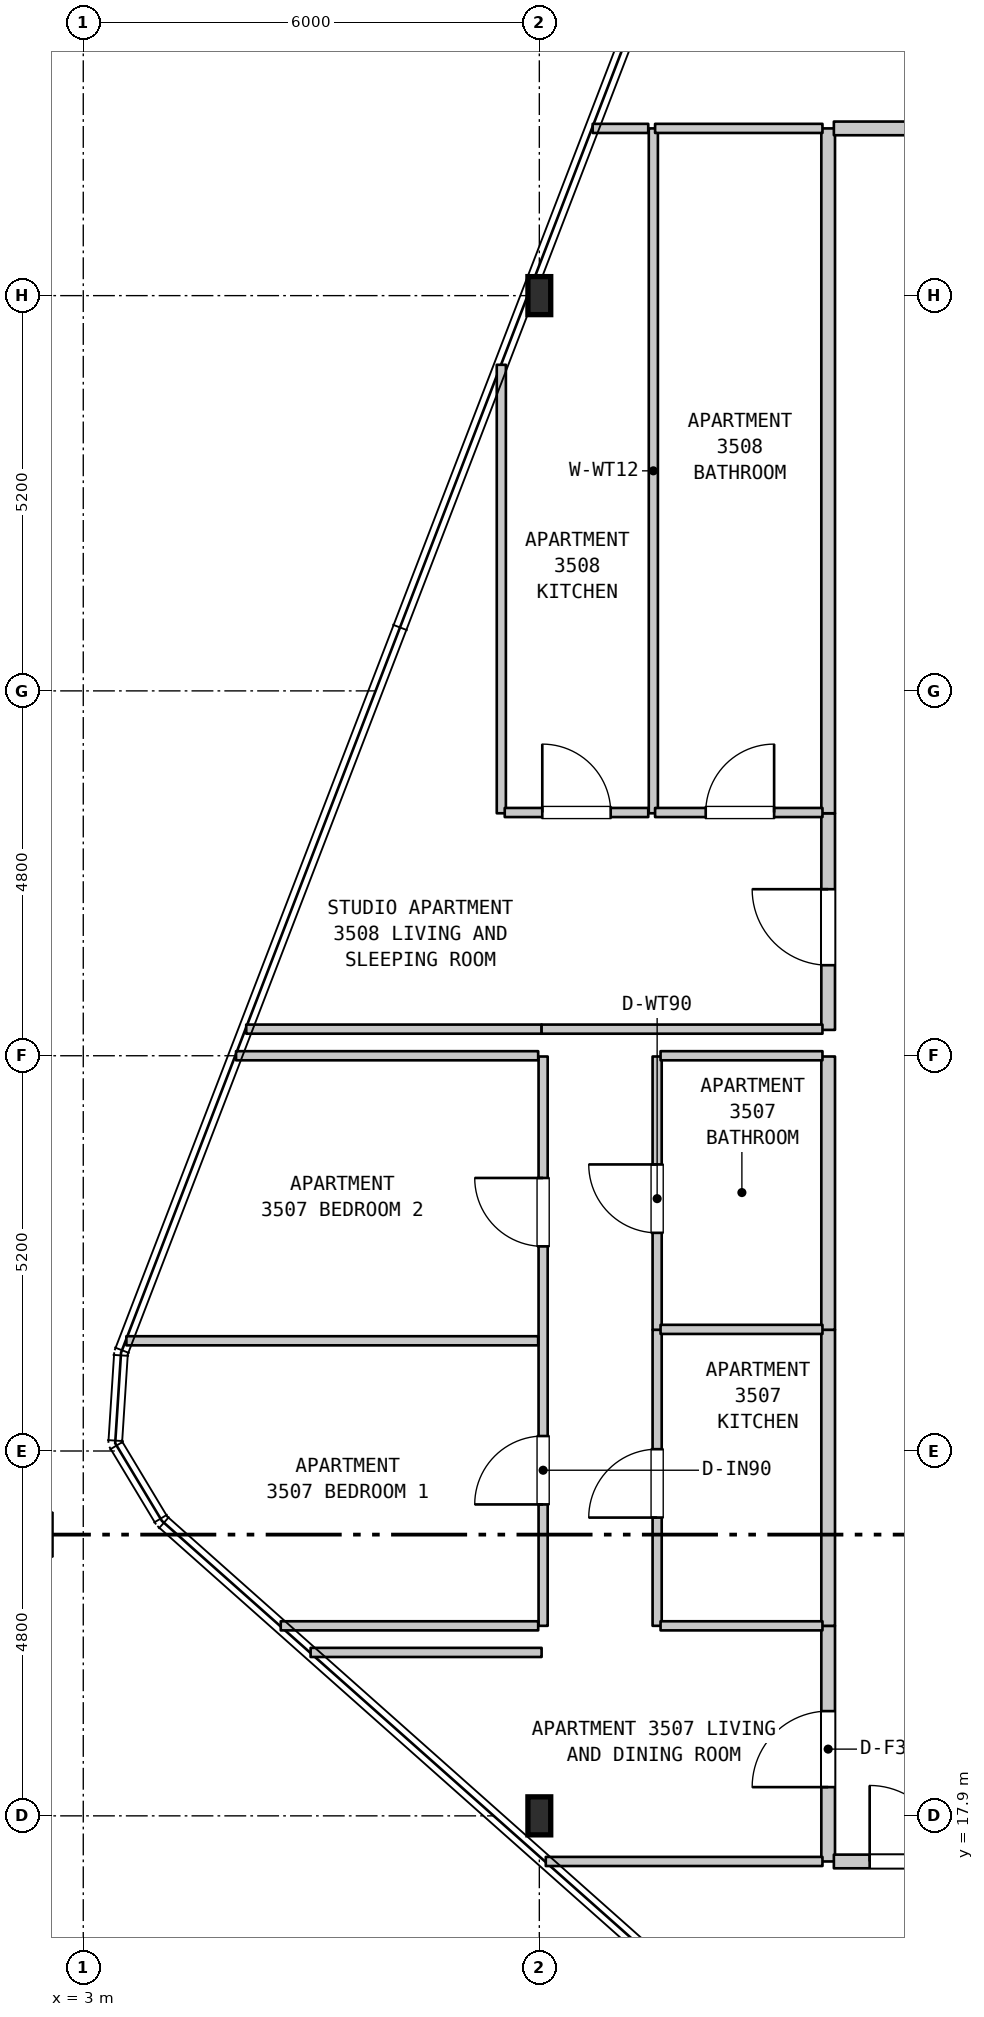
"""IFC4 building model, lengths in metres.
Left out: names, types, materials, properties, quantities, classifications, styles, units other than length and angle.
Written with IfcOpenShell. Run it as: python <this file> out.ifc"""

import sys

from ifc_helpers import new_model, si_unit, direction, frame, frame_2d, origin, origin_2d, place, context, subcontext, project, spatial, rectangle, i_section, extrude, element, fill, save


model = new_model("IFC4")
c1 = context("Model", 3, precision=1e-05, world=origin(), true_north=direction((0.0, 1.0)))
c2 = subcontext(c1, "Body", "Model", "MODEL_VIEW")
j1 = project(units=[si_unit("LENGTHUNIT", "METRE"), si_unit("PLANEANGLEUNIT", "RADIAN")], contexts=[c1])
p1 = place(None, origin())
s1 = spatial("IfcSite", under=j1, at=p1, CompositionType="ELEMENT")
p2 = place(p1, origin())
s2 = spatial("IfcBuilding", under=s1, at=p2, CompositionType="ELEMENT")
p3 = place(p2, frame((0.0, 0.0, 144.6)))
s3 = spatial("IfcBuildingStorey", under=s2, at=p3, CompositionType="ELEMENT", Elevation=144.6)
for number, where, z_axis, x_axis in (
    (1, (9.0, 17.9, 0.0), (0.0, 0.0, 1.0), (1.0, 0.0, 0.0)),
    (2, (9.0, 37.9, 0.0), (0.0, 0.0, 1.0), (1.0, 0.0, 0.0)),
):
    element("IfcColumn", number, at=place(p3, frame(where, z_axis=z_axis, x_axis=x_axis)), inside=s3, PredefinedType="COLUMN", context=c2, shape_type="SweptSolid", body=[
        extrude(i_section(OverallWidth=0.3, OverallDepth=0.5, WebThickness=0.014, FlangeThickness=0.028, FilletRadius=0.027, at=origin_2d()), origin(), (0.0, 0.0, 1.0), 3.7),
    ])
p4 = place(p3, frame((8.5, 31.09, 0.0), z_axis=(0.0, 0.0, 1.0), x_axis=(0.0, 1.0, 0.0)))
e3 = element("IfcWall", 3, at=p4, inside=s3, PredefinedType="PARTITIONING", context=c2, shape_type="SweptSolid", body=[
    extrude(rectangle(XDim=5.9, YDim=0.12, at=frame_2d((2.95, 0.0))), origin(), (0.0, 0.0, 1.0), 3.385),
])
p5 = place(p3, frame((9.05, 20.4, 0.0), z_axis=(0.0, 0.0, 1.0), x_axis=(0.0, 1.0, 0.0)))
e4 = element("IfcWall", 4, at=p5, inside=s3, PredefinedType="PARTITIONING", context=c2, shape_type="SweptSolid", body=[
    extrude(rectangle(XDim=7.49, YDim=0.12, at=frame_2d((3.745, 0.0))), origin(), (0.0, 0.0, 1.0), 2.785),
])
p6 = place(p5, frame((1.597, 0.0, 0.0)))
e5 = element("IfcOpeningElement", 5, at=p6, cuts=e4, PredefinedType="OPENING", context=c2, shape_type="SweptSolid", body=[
    extrude(rectangle(XDim=0.9, YDim=2.15, at=frame_2d((0.45, 1.075))), frame((0.0, 0.07, 0.0), z_axis=(0.0, -1.0, 0.0), x_axis=(1.0, 0.0, 0.0)), (0.0, 0.0, 1.0), 0.14),
])
p7 = place(p5, frame((4.992, 0.0, 0.0)))
e6 = element("IfcOpeningElement", 6, at=p7, cuts=e4, PredefinedType="OPENING", context=c2, shape_type="SweptSolid", body=[
    extrude(rectangle(XDim=0.9, YDim=2.15, at=frame_2d((0.45, 1.075))), frame((0.0, 0.07, 0.0), z_axis=(0.0, -1.0, 0.0), x_axis=(1.0, 0.0, 0.0)), (0.0, 0.0, 1.0), 0.14),
])
p8 = place(p3, frame((10.5, 31.09, 0.0), z_axis=(0.0, 0.0, 1.0), x_axis=(0.0, 1.0, 0.0)))
e7 = element("IfcWall", 7, at=p8, inside=s3, PredefinedType="PARTITIONING", context=c2, shape_type="SweptSolid", body=[
    extrude(rectangle(XDim=9.01, YDim=0.12, at=frame_2d((4.505, 0.0))), origin(), (0.0, 0.0, 1.0), 3.385),
])
p9 = place(p3, frame((10.55, 20.4, 0.0), z_axis=(0.0, 0.0, 1.0), x_axis=(0.0, 1.0, 0.0)))
e8 = element("IfcWall", 8, at=p9, inside=s3, PredefinedType="PARTITIONING", context=c2, shape_type="SweptSolid", body=[
    extrude(rectangle(XDim=3.895, YDim=0.12, at=frame_2d((1.948, 0.0))), origin(), (0.0, 0.0, 1.0), 3.385),
])
p10 = place(p9, frame((1.424, 0.0, 0.0)))
e9 = element("IfcOpeningElement", 9, at=p10, cuts=e8, PredefinedType="OPENING", context=c2, shape_type="SweptSolid", body=[
    extrude(rectangle(XDim=0.9, YDim=2.15, at=frame_2d((0.45, 1.075))), frame((0.0, 0.07, 0.0), z_axis=(0.0, -1.0, 0.0), x_axis=(1.0, 0.0, 0.0)), (0.0, 0.0, 1.0), 0.14),
])
p11 = place(p3, frame((10.55, 24.295, 0.0), z_axis=(0.0, 0.0, 1.0), x_axis=(0.0, 1.0, 0.0)))
e10 = element("IfcWall", 10, at=p11, inside=s3, PredefinedType="PARTITIONING", context=c2, shape_type="SweptSolid", body=[
    extrude(rectangle(XDim=3.595, YDim=0.12, at=frame_2d((1.797, 0.0))), origin(), (0.0, 0.0, 1.0), 3.385),
])
p12 = place(p11, frame((1.275, 0.0, 0.0)))
e11 = element("IfcOpeningElement", 11, at=p12, cuts=e10, PredefinedType="OPENING", context=c2, shape_type="SweptSolid", body=[
    extrude(rectangle(XDim=0.9, YDim=2.1, at=frame_2d((0.45, 1.05))), frame((0.0, 0.07, 0.0), z_axis=(0.0, -1.0, 0.0), x_axis=(1.0, 0.0, 0.0)), (0.0, 0.0, 1.0), 0.14),
])
p13 = place(p3, frame((12.8, 17.3, 0.0), z_axis=(0.0, 0.0, 1.0), x_axis=(0.0, 1.0, 0.0)))
e12 = element("IfcWall", 12, at=p13, inside=s3, PredefinedType="STANDARD", context=c2, shape_type="SweptSolid", body=[
    extrude(rectangle(XDim=3.1, YDim=0.18, at=frame_2d((1.55, 0.0))), origin(), (0.0, 0.0, 1.0), 3.385),
])
p14 = place(p13, frame((0.978, 0.0, 0.0)))
e13 = element("IfcOpeningElement", 13, at=p14, cuts=e12, PredefinedType="OPENING", context=c2, shape_type="SweptSolid", body=[
    extrude(rectangle(XDim=1.0, YDim=2.15, at=frame_2d((0.5, 1.075))), frame((0.0, 0.1, 0.0), z_axis=(0.0, -1.0, 0.0), x_axis=(1.0, 0.0, 0.0)), (0.0, 0.0, 1.0), 0.2),
])
p15 = place(p3, frame((12.8, 20.4, 0.0), z_axis=(0.0, 0.0, 1.0), x_axis=(0.0, 1.0, 0.0)))
e14 = element("IfcWall", 14, at=p15, inside=s3, PredefinedType="STANDARD", context=c2, shape_type="SweptSolid", body=[
    extrude(rectangle(XDim=3.895, YDim=0.18, at=frame_2d((1.948, 0.0))), origin(), (0.0, 0.0, 1.0), 3.385),
])
p16 = place(p3, frame((12.8, 24.295, 0.0), z_axis=(0.0, 0.0, 1.0), x_axis=(0.0, 1.0, 0.0)))
e15 = element("IfcWall", 15, at=p16, inside=s3, PredefinedType="STANDARD", context=c2, shape_type="SweptSolid", body=[
    extrude(rectangle(XDim=3.595, YDim=0.18, at=frame_2d((1.797, 0.0))), origin(), (0.0, 0.0, 1.0), 3.385),
])
p17 = place(p3, frame((12.8, 28.24, 0.0), z_axis=(0.0, 0.0, 1.0), x_axis=(0.0, 1.0, 0.0)))
e16 = element("IfcWall", 16, at=p17, inside=s3, PredefinedType="STANDARD", context=c2, shape_type="SweptSolid", body=[
    extrude(rectangle(XDim=2.85, YDim=0.18, at=frame_2d((1.425, 0.0))), origin(), (0.0, 0.0, 1.0), 3.385),
])
p18 = place(p17, frame((0.851, 0.0, 0.0)))
e17 = element("IfcOpeningElement", 17, at=p18, cuts=e16, PredefinedType="OPENING", context=c2, shape_type="SweptSolid", body=[
    extrude(rectangle(XDim=1.0, YDim=2.15, at=frame_2d((0.5, 1.075))), frame((0.0, 0.1, 0.0), z_axis=(0.0, -1.0, 0.0), x_axis=(1.0, 0.0, 0.0)), (0.0, 0.0, 1.0), 0.2),
])
p19 = place(p3, frame((12.8, 31.09, 0.0), z_axis=(0.0, 0.0, 1.0), x_axis=(0.0, 1.0, 0.0)))
e18 = element("IfcWall", 18, at=p19, inside=s3, PredefinedType="STANDARD", context=c2, shape_type="SweptSolid", body=[
    extrude(rectangle(XDim=9.01, YDim=0.18, at=frame_2d((4.505, 0.0))), origin(), (0.0, 0.0, 1.0), 3.385),
])
p20 = place(p3, frame((9.085, 17.3, 0.0), z_axis=(0.0, 0.0, 1.0), x_axis=(1.0, 0.0, 0.0)))
e19 = element("IfcWall", 19, at=p20, inside=s3, PredefinedType="PARTITIONING", context=c2, shape_type="SweptSolid", body=[
    extrude(rectangle(XDim=3.64, YDim=0.12, at=frame_2d((1.82, 0.0))), origin(), (0.0, 0.0, 1.0), 3.385),
])
p21 = place(p3, frame((12.875, 17.3, 0.0), z_axis=(0.0, 0.0, 1.0), x_axis=(1.0, 0.0, 0.0)))
e20 = element("IfcWall", 20, at=p21, inside=s3, PredefinedType="STANDARD", context=c2, shape_type="SweptSolid", body=[
    extrude(rectangle(XDim=3.28, YDim=0.18, at=frame_2d((1.64, 0.0))), origin(), (0.0, 0.0, 1.0), 3.385),
])
p22 = place(p21, frame((0.471, 0.0, 0.0)))
e21 = element("IfcOpeningElement", 21, at=p22, cuts=e20, PredefinedType="OPENING", context=c2, shape_type="SweptSolid", body=[
    extrude(rectangle(XDim=1.0, YDim=2.15, at=frame_2d((0.5, 1.075))), frame((0.0, 0.1, 0.0), z_axis=(0.0, -1.0, 0.0), x_axis=(1.0, 0.0, 0.0)), (0.0, 0.0, 1.0), 0.2),
])
p23 = place(p3, frame((5.991, 20.05, 0.0), z_axis=(0.0, 0.0, 1.0), x_axis=(1.0, 0.0, 0.0)))
e22 = element("IfcWall", 22, at=p23, inside=s3, PredefinedType="PARTITIONING", context=c2, shape_type="SweptSolid", body=[
    extrude(rectangle(XDim=3.039, YDim=0.12, at=frame_2d((1.52, 0.0))), origin(), (0.0, 0.0, 1.0), 3.385),
])
p24 = place(p3, frame((5.598, 20.4, 0.0), z_axis=(0.0, 0.0, 1.0), x_axis=(1.0, 0.0, 0.0)))
e23 = element("IfcWall", 23, at=p24, inside=s3, PredefinedType="PARTITIONING", context=c2, shape_type="SweptSolid", body=[
    extrude(rectangle(XDim=3.387, YDim=0.12, at=frame_2d((1.694, 0.0))), origin(), (0.0, 0.0, 1.0), 3.385),
])
p25 = place(p3, frame((10.595, 20.4, 0.0), z_axis=(0.0, 0.0, 1.0), x_axis=(1.0, 0.0, 0.0)))
e24 = element("IfcWall", 24, at=p25, inside=s3, PredefinedType="PARTITIONING", context=c2, shape_type="SweptSolid", body=[
    extrude(rectangle(XDim=2.13, YDim=0.12, at=frame_2d((1.065, 0.0))), origin(), (0.0, 0.0, 1.0), 3.385),
])
p26 = place(p3, frame((3.567, 24.15, 0.0), z_axis=(0.0, 0.0, 1.0), x_axis=(1.0, 0.0, 0.0)))
e25 = element("IfcWall", 25, at=p26, inside=s3, PredefinedType="PARTITIONING", context=c2, shape_type="SweptSolid", body=[
    extrude(rectangle(XDim=5.418, YDim=0.12, at=frame_2d((2.709, 0.0))), origin(), (0.0, 0.0, 1.0), 3.385),
])
p27 = place(p3, frame((10.595, 24.3, 0.0), z_axis=(0.0, 0.0, 1.0), x_axis=(1.0, 0.0, 0.0)))
e26 = element("IfcWall", 26, at=p27, inside=s3, PredefinedType="PARTITIONING", context=c2, shape_type="SweptSolid", body=[
    extrude(rectangle(XDim=2.13, YDim=0.12, at=frame_2d((1.065, 0.0))), origin(), (0.0, 0.0, 1.0), 3.385),
])
p28 = place(p3, frame((5.01, 27.9, 0.0), z_axis=(0.0, 0.0, 1.0), x_axis=(1.0, 0.0, 0.0)))
e27 = element("IfcWall", 27, at=p28, inside=s3, PredefinedType="PARTITIONING", context=c2, shape_type="SweptSolid", body=[
    extrude(rectangle(XDim=3.975, YDim=0.12, at=frame_2d((1.988, 0.0))), origin(), (0.0, 0.0, 1.0), 3.385),
])
p29 = place(p3, frame((10.595, 27.9, 0.0), z_axis=(0.0, 0.0, 1.0), x_axis=(1.0, 0.0, 0.0)))
e28 = element("IfcWall", 28, at=p29, inside=s3, PredefinedType="PARTITIONING", context=c2, shape_type="SweptSolid", body=[
    extrude(rectangle(XDim=2.13, YDim=0.12, at=frame_2d((1.065, 0.0))), origin(), (0.0, 0.0, 1.0), 3.385),
])
p30 = place(p3, frame((5.144, 28.25, 0.0), z_axis=(0.0, 0.0, 1.0), x_axis=(1.0, 0.0, 0.0)))
e29 = element("IfcWall", 29, at=p30, inside=s3, PredefinedType="PARTITIONING", context=c2, shape_type="SweptSolid", body=[
    extrude(rectangle(XDim=3.886, YDim=0.12, at=frame_2d((1.943, 0.0))), origin(), (0.0, 0.0, 1.0), 3.385),
])
p31 = place(p3, frame((9.03, 28.25, 0.0), z_axis=(0.0, 0.0, 1.0), x_axis=(1.0, 0.0, 0.0)))
e30 = element("IfcWall", 30, at=p31, inside=s3, PredefinedType="PARTITIONING", context=c2, shape_type="SweptSolid", body=[
    extrude(rectangle(XDim=3.695, YDim=0.12, at=frame_2d((1.848, 0.0))), origin(), (0.0, 0.0, 1.0), 3.385),
])
p32 = place(p3, frame((8.545, 31.1, 0.0), z_axis=(0.0, 0.0, 1.0), x_axis=(1.0, 0.0, 0.0)))
e31 = element("IfcWall", 31, at=p32, inside=s3, PredefinedType="PARTITIONING", context=c2, shape_type="SweptSolid", body=[
    extrude(rectangle(XDim=1.888, YDim=0.12, at=frame_2d((0.944, 0.0))), origin(), (0.0, 0.0, 1.0), 3.385),
])
p33 = place(p32, frame((0.494, 0.0, 0.0)))
e32 = element("IfcOpeningElement", 32, at=p33, cuts=e31, PredefinedType="OPENING", context=c2, shape_type="SweptSolid", body=[
    extrude(rectangle(XDim=0.9, YDim=2.15, at=frame_2d((0.45, 1.075))), frame((0.0, 0.07, 0.0), z_axis=(0.0, -1.0, 0.0), x_axis=(1.0, 0.0, 0.0)), (0.0, 0.0, 1.0), 0.14),
])
p34 = place(p3, frame((10.523, 31.1, 0.0), z_axis=(0.0, 0.0, 1.0), x_axis=(1.0, 0.0, 0.0)))
e33 = element("IfcWall", 33, at=p34, inside=s3, PredefinedType="PARTITIONING", context=c2, shape_type="SweptSolid", body=[
    extrude(rectangle(XDim=2.202, YDim=0.12, at=frame_2d((1.101, 0.0))), origin(), (0.0, 0.0, 1.0), 3.385),
])
p35 = place(p34, frame((0.666, 0.0, 0.0)))
e34 = element("IfcOpeningElement", 34, at=p35, cuts=e33, PredefinedType="OPENING", context=c2, shape_type="SweptSolid", body=[
    extrude(rectangle(XDim=0.9, YDim=2.1, at=frame_2d((0.45, 1.05))), frame((0.0, 0.07, 0.0), z_axis=(0.0, -1.0, 0.0), x_axis=(1.0, 0.0, 0.0)), (0.0, 0.0, 1.0), 0.14),
])
p36 = place(p3, frame((9.702, 40.1, 0.0), z_axis=(0.0, 0.0, 1.0), x_axis=(1.0, 0.0, 0.0)))
e35 = element("IfcWall", 35, at=p36, inside=s3, PredefinedType="PARTITIONING", context=c2, shape_type="SweptSolid", body=[
    extrude(rectangle(XDim=0.731, YDim=0.12, at=frame_2d((0.366, 0.0))), origin(), (0.0, 0.0, 1.0), 3.385),
])
p37 = place(p3, frame((10.523, 40.1, 0.0), z_axis=(0.0, 0.0, 1.0), x_axis=(1.0, 0.0, 0.0)))
e36 = element("IfcWall", 36, at=p37, inside=s3, PredefinedType="PARTITIONING", context=c2, shape_type="SweptSolid", body=[
    extrude(rectangle(XDim=2.202, YDim=0.12, at=frame_2d((1.101, 0.0))), origin(), (0.0, 0.0, 1.0), 3.385),
])
p38 = place(p3, frame((12.875, 40.1, 0.0), z_axis=(0.0, 0.0, 1.0), x_axis=(1.0, 0.0, 0.0)))
e37 = element("IfcWall", 37, at=p38, inside=s3, PredefinedType="STANDARD", context=c2, shape_type="SweptSolid", body=[
    extrude(rectangle(XDim=1.48, YDim=0.18, at=frame_2d((0.74, 0.0))), origin(), (0.0, 0.0, 1.0), 3.385),
])
p39 = place(p6, origin())
e38 = element("IfcDoor", 38, at=p39, inside=s3, OperationType="SINGLE_SWING_LEFT", PredefinedType="DOOR", context=c2, shape_type="SweptSolid", body=[
    extrude(rectangle(XDim=0.9, YDim=2.15, at=frame_2d((0.45, 1.075))), frame((0.0, 0.025, 0.0), z_axis=(0.0, -1.0, 0.0), x_axis=(1.0, 0.0, 0.0)), (0.0, 0.0, 1.0), 0.05),
])
fill(e5, e38)
p40 = place(p7, origin())
e39 = element("IfcDoor", 39, at=p40, inside=s3, OperationType="SINGLE_SWING_RIGHT", PredefinedType="DOOR", context=c2, shape_type="SweptSolid", body=[
    extrude(rectangle(XDim=0.9, YDim=2.15, at=frame_2d((0.45, 1.075))), frame((0.0, 0.025, 0.0), z_axis=(0.0, -1.0, 0.0), x_axis=(1.0, 0.0, 0.0)), (0.0, 0.0, 1.0), 0.05),
])
fill(e6, e39)
p41 = place(p10, origin())
e40 = element("IfcDoor", 40, at=p41, inside=s3, OperationType="SINGLE_SWING_LEFT", PredefinedType="DOOR", context=c2, shape_type="SweptSolid", body=[
    extrude(rectangle(XDim=0.9, YDim=2.15, at=frame_2d((0.45, 1.075))), frame((0.0, 0.025, 0.0), z_axis=(0.0, -1.0, 0.0), x_axis=(1.0, 0.0, 0.0)), (0.0, 0.0, 1.0), 0.05),
])
fill(e9, e40)
p42 = place(p12, origin())
e41 = element("IfcDoor", 41, at=p42, inside=s3, OperationType="SINGLE_SWING_RIGHT", PredefinedType="DOOR", context=c2, shape_type="SweptSolid", body=[
    extrude(rectangle(XDim=0.9, YDim=2.1, at=frame_2d((0.45, 1.05))), frame((0.0, 0.025, 0.0), z_axis=(0.0, -1.0, 0.0), x_axis=(1.0, 0.0, 0.0)), (0.0, 0.0, 1.0), 0.05),
])
fill(e11, e41)
p43 = place(p14, origin())
e42 = element("IfcDoor", 42, at=p43, inside=s3, OperationType="SINGLE_SWING_LEFT", PredefinedType="DOOR", context=c2, shape_type="SweptSolid", body=[
    extrude(rectangle(XDim=1.0, YDim=2.15, at=frame_2d((0.5, 1.075))), frame((0.0, 0.025, 0.0), z_axis=(0.0, -1.0, 0.0), x_axis=(1.0, 0.0, 0.0)), (0.0, 0.0, 1.0), 0.05),
])
fill(e13, e42)
p44 = place(p18, origin())
e43 = element("IfcDoor", 43, at=p44, inside=s3, OperationType="SINGLE_SWING_RIGHT", PredefinedType="DOOR", context=c2, shape_type="SweptSolid", body=[
    extrude(rectangle(XDim=1.0, YDim=2.15, at=frame_2d((0.5, 1.075))), frame((0.0, 0.025, 0.0), z_axis=(0.0, -1.0, 0.0), x_axis=(1.0, 0.0, 0.0)), (0.0, 0.0, 1.0), 0.05),
])
fill(e17, e43)
p45 = place(p22, origin())
e44 = element("IfcDoor", 44, at=p45, inside=s3, OperationType="SINGLE_SWING_LEFT", PredefinedType="DOOR", context=c2, shape_type="SweptSolid", body=[
    extrude(rectangle(XDim=1.0, YDim=2.15, at=frame_2d((0.5, 1.075))), frame((0.0, 0.025, 0.0), z_axis=(0.0, -1.0, 0.0), x_axis=(1.0, 0.0, 0.0)), (0.0, 0.0, 1.0), 0.05),
])
fill(e21, e44)
p46 = place(p33, origin())
e45 = element("IfcDoor", 45, at=p46, inside=s3, OperationType="SINGLE_SWING_LEFT", PredefinedType="DOOR", context=c2, shape_type="SweptSolid", body=[
    extrude(rectangle(XDim=0.9, YDim=2.15, at=frame_2d((0.45, 1.075))), frame((0.0, 0.025, 0.0), z_axis=(0.0, -1.0, 0.0), x_axis=(1.0, 0.0, 0.0)), (0.0, 0.0, 1.0), 0.05),
])
fill(e32, e45)
p47 = place(p35, origin())
e46 = element("IfcDoor", 46, at=p47, inside=s3, OperationType="SINGLE_SWING_RIGHT", PredefinedType="DOOR", context=c2, shape_type="SweptSolid", body=[
    extrude(rectangle(XDim=0.9, YDim=2.1, at=frame_2d((0.45, 1.05))), frame((0.0, 0.025, 0.0), z_axis=(0.0, -1.0, 0.0), x_axis=(1.0, 0.0, 0.0)), (0.0, 0.0, 1.0), 0.05),
])
fill(e34, e46)
save(model, sys.argv[1])
